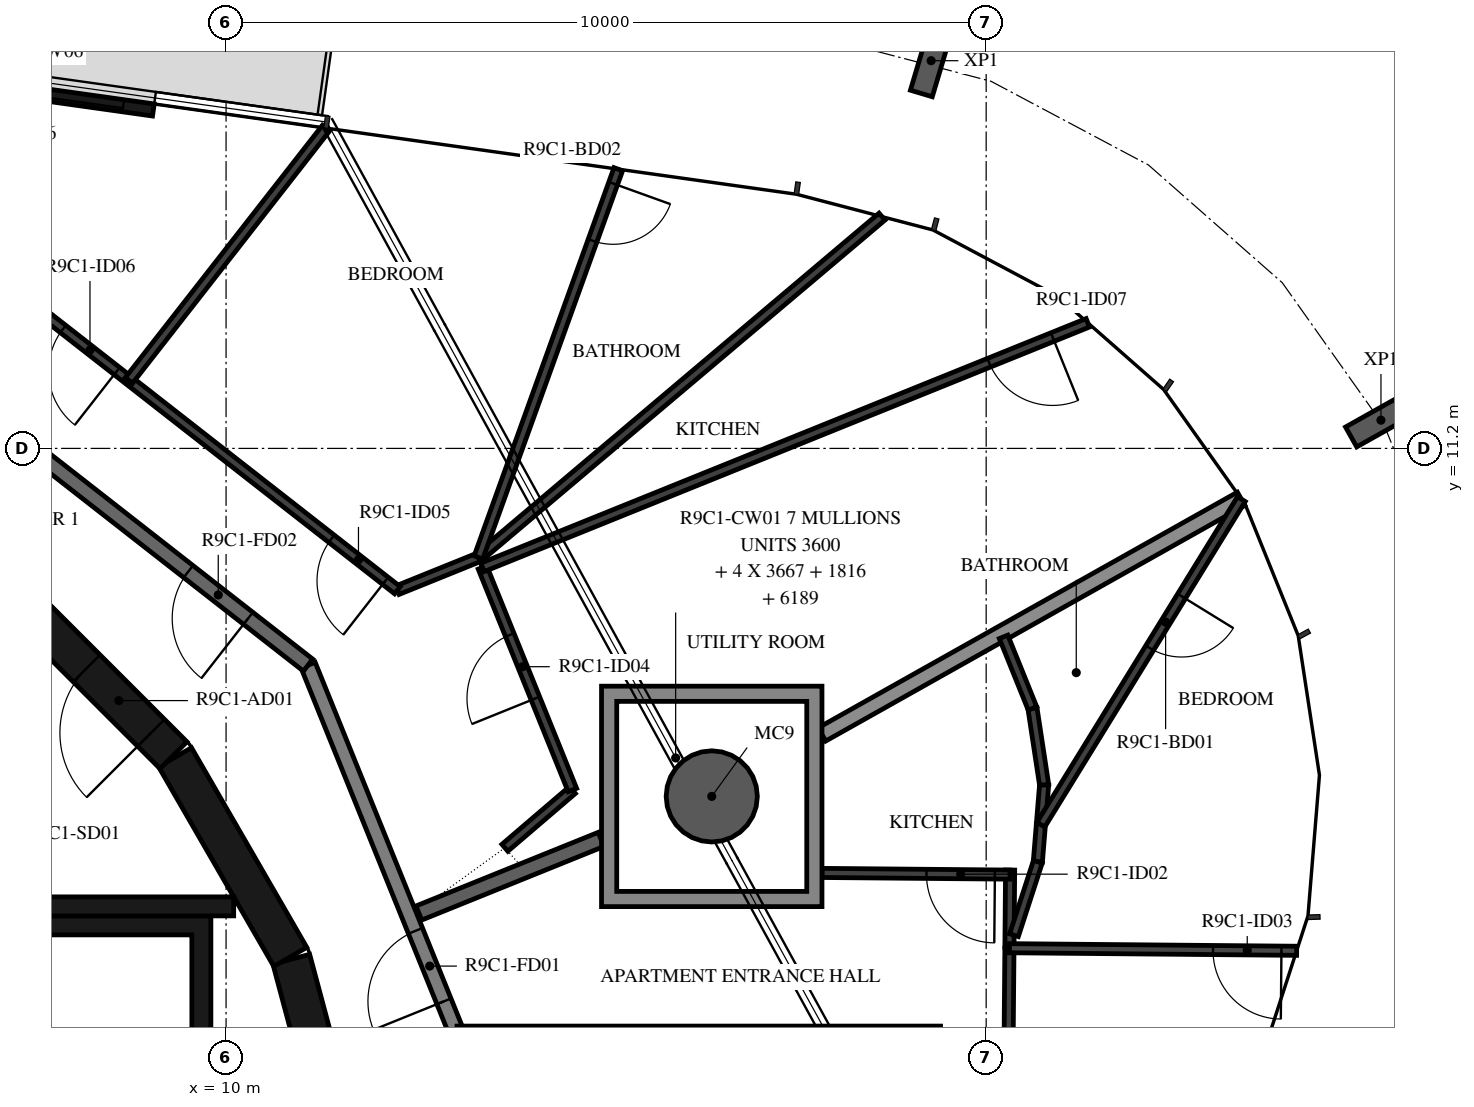
"""IFC4 building model, lengths in metres.
Left out: names, types, materials, properties, quantities, classifications, styles, units other than length and angle.
Written with IfcOpenShell. Run it as: python <this file> out.ifc"""

import sys

from ifc_helpers import new_model, si_unit, direction, frame, frame_2d, origin, origin_2d, place, context, subcontext, project, spatial, polyline, rectangle, hollow_circle, i_section, outline, extrude, element, fill, save


model = new_model("IFC4")
c1 = context("Model", 3, precision=1e-05, world=origin(), true_north=direction((0.0, 1.0)))
c2 = subcontext(c1, "Body", "Model", "MODEL_VIEW")
j1 = project(units=[si_unit("LENGTHUNIT", "METRE"), si_unit("PLANEANGLEUNIT", "RADIAN")], contexts=[c1])
p1 = place(None, origin())
s1 = spatial("IfcSite", under=j1, at=p1, CompositionType="ELEMENT")
p2 = place(p1, origin())
s2 = spatial("IfcBuilding", under=s1, at=p2, CompositionType="ELEMENT")
p3 = place(p2, frame((0.0, 0.0, 357.5)))
s3 = spatial("IfcBuildingStorey", under=s2, at=p3, CompositionType="ELEMENT", Elevation=357.5)
p4 = place(p3, frame((16.39, 6.622, -0.38), z_axis=(0.0, 0.0, 1.0), x_axis=(1.0, 0.0, 0.0)))
e1 = element("IfcColumn", 1, at=p4, inside=s3, PredefinedType="COLUMN", context=c2, shape_type="SweptSolid", body=[
    extrude(hollow_circle(Radius=0.6, WallThickness=0.03, at=origin_2d()), origin(), (0.0, 0.0, 1.0), 3.5),
])
for number, where, z_axis, x_axis in (
    (2, (25.194, 11.571, -0.38), (0.0, 0.0, 1.0), (0.49, -0.872, 0.0)),
    (3, (19.276, 16.301, -0.38), (0.0, 0.0, 1.0), (0.958, -0.286, 0.0)),
):
    element("IfcColumn", number, at=place(p3, frame(where, z_axis=z_axis, x_axis=x_axis)), inside=s3, PredefinedType="COLUMN", context=c2, shape_type="SweptSolid", body=[
        extrude(i_section(OverallWidth=0.3, OverallDepth=0.9, WebThickness=0.019, FlangeThickness=0.035, FilletRadius=0.03, at=origin_2d()), origin(), (0.0, 0.0, 1.0), 3.5),
    ])
p5 = place(p3, frame((9.043, 15.652, 0.0), z_axis=(0.0, 0.0, 1.0), x_axis=(-0.990270382149, 0.139156639217, 0.0)))
e4 = element("IfcWall", 4, at=p5, inside=s3, PredefinedType="STANDARD", context=c2, shape_type="SweptSolid", body=[
    extrude(rectangle(XDim=3.2, YDim=0.16, at=frame_2d((1.6, 0.0))), origin(), (0.0, 0.0, 1.0), 3.12),
])
p6 = place(p5, frame((0.4, 0.0, 0.0)))
e5 = element("IfcOpeningElement", 5, at=p6, cuts=e4, PredefinedType="OPENING", context=c2, shape_type="SweptSolid", body=[
    extrude(rectangle(XDim=2.4, YDim=2.4, at=frame_2d((1.2, 1.2))), frame((0.0, 0.09, 0.0), z_axis=(0.0, -1.0, 0.0), x_axis=(1.0, 0.0, 0.0)), (0.0, 0.0, 1.0), 0.18),
])
for number, where, z_axis, x_axis in (
    (6, (11.643, 1.55, 0.0), (0.0, 0.0, 1.0), (-0.259, 0.966, 0.0)),
    (7, (10.845, 4.51, 0.0), (0.0, 0.0, 1.0), (-0.5, 0.866, 0.0)),
):
    element("IfcWall", number, at=place(p3, frame(where, z_axis=z_axis, x_axis=x_axis)), inside=s3, PredefinedType="SHEAR", context=c2, shape_type="SweptSolid", body=[
        extrude(rectangle(XDim=3.033, YDim=0.5, at=frame_2d((1.516, 0.0))), origin(), (0.0, 0.0, 1.0), 3.12),
    ])
p7 = place(p3, frame((9.308, 7.164, 0.0), z_axis=(0.0, 0.0, 1.0), x_axis=(-0.707106781187, 0.707106781187, 0.0)))
e8 = element("IfcWall", 8, at=p7, inside=s3, PredefinedType="SHEAR", context=c2, shape_type="SweptSolid", body=[
    extrude(rectangle(XDim=3.032, YDim=0.5, at=frame_2d((1.516, 0.0))), origin(), (0.0, 0.0, 1.0), 3.12),
])
p8 = place(p7, frame((0.416, 0.0, 0.0)))
e9 = element("IfcOpeningElement", 9, at=p8, cuts=e8, PredefinedType="OPENING", context=c2, shape_type="SweptSolid", body=[
    extrude(rectangle(XDim=1.2, YDim=2.1, at=frame_2d((0.6, 1.05))), frame((0.0, 0.26, 0.0), z_axis=(0.0, -1.0, 0.0), x_axis=(1.0, 0.0, 0.0)), (0.0, 0.0, 1.0), 0.52),
])
p9 = place(p3, frame((7.0, 5.175, 0.0), z_axis=(0.0, 0.0, 1.0), x_axis=(1.0, 0.0, 0.0)))
e10 = element("IfcWall", 10, at=p9, inside=s3, PredefinedType="SHEAR", context=c2, shape_type="SweptSolid", body=[
    extrude(rectangle(XDim=3.1, YDim=0.25, at=frame_2d((1.55, 0.0))), origin(), (0.0, 0.0, 1.0), 3.12),
])
p10 = place(p3, origin())
e11 = element("IfcWall", 11, at=p10, inside=s3, PredefinedType="SHEAR", context=c2, shape_type="SweptSolid", body=[
    extrude(outline(polyline([(-9.8, 1.9), (-9.55, 1.9), (-9.55, 4.8), (3.1, 4.8), (3.1, 1.9), (3.35, 1.9), (3.35, 4.8), (5.25, 4.8), (5.25, 1.9), (5.5, 1.9), (5.5, 4.8), (7.4, 4.8), (7.4, 1.9), (7.65, 1.9), (7.65, 4.8), (9.55, 4.8), (9.55, 1.9), (9.8, 1.9), (9.8, 4.8), (9.8, 5.05), (-9.8, 5.05), (-9.8, 4.8), (-9.8, 1.9)])), origin(), (0.0, 0.0, 1.0), 3.12),
])
p11 = place(p3, frame((13.769, 1.691, 0.0), z_axis=(0.0, 0.0, 1.0), x_axis=(-0.374618189599, 0.92717916932, 0.0)))
e12 = element("IfcWall", 12, at=p11, inside=s3, PredefinedType="STANDARD", context=c2, shape_type="SweptSolid", body=[
    extrude(rectangle(XDim=7.181, YDim=0.2, at=frame_2d((3.591, 0.0))), origin(), (0.0, 0.0, 1.0), 3.12),
])
p12 = place(p11, frame((2.41, 0.0, 0.0)))
e13 = element("IfcOpeningElement", 13, at=p12, cuts=e12, PredefinedType="OPENING", context=c2, shape_type="SweptSolid", body=[
    extrude(rectangle(XDim=1.0, YDim=2.1, at=frame_2d((0.5, 1.05))), frame((0.0, 0.11, 0.0), z_axis=(0.0, -1.0, 0.0), x_axis=(1.0, 0.0, 0.0)), (0.0, 0.0, 1.0), 0.22),
])
p13 = place(p3, frame((11.079, 8.349, 0.0), z_axis=(0.0, 0.0, 1.0), x_axis=(-0.78800478687, 0.615669112324, 0.0)))
e14 = element("IfcWall", 14, at=p13, inside=s3, PredefinedType="STANDARD", context=c2, shape_type="SweptSolid", body=[
    extrude(rectangle(XDim=7.181, YDim=0.2, at=frame_2d((3.591, 0.0))), origin(), (0.0, 0.0, 1.0), 3.12),
])
p14 = place(p13, frame((1.0, 0.0, 0.0)))
e15 = element("IfcOpeningElement", 15, at=p14, cuts=e14, PredefinedType="OPENING", context=c2, shape_type="SweptSolid", body=[
    extrude(rectangle(XDim=1.0, YDim=2.1, at=frame_2d((0.5, 1.05))), frame((0.0, 0.11, 0.0), z_axis=(0.0, -1.0, 0.0), x_axis=(1.0, 0.0, 0.0)), (0.0, 0.0, 1.0), 0.22),
])
p15 = place(p3, frame((19.4, 3.5, 0.0), z_axis=(0.0, 0.0, 1.0), x_axis=(-1.0, 0.0, 0.0)))
e16 = element("IfcWall", 16, at=p15, inside=s3, PredefinedType="STANDARD", context=c2, shape_type="SweptSolid", body=[
    extrude(rectangle(XDim=6.362, YDim=0.2, at=frame_2d((3.181, 0.0))), origin(), (0.0, 0.0, 1.0), 3.12),
])
p16 = place(p3, frame((14.934, 6.056, 0.0), z_axis=(0.0, 0.0, 1.0), x_axis=(-0.927181938396, -0.374611336071, 0.0)))
e17 = element("IfcWall", 17, at=p16, inside=s3, PredefinedType="STANDARD", context=c2, shape_type="SweptSolid", body=[
    extrude(rectangle(XDim=2.586, YDim=0.2, at=frame_2d((1.293, 0.0))), origin(), (0.0, 0.0, 1.0), 3.12),
])
p17 = place(p3, frame((23.354, 10.537, 0.0), z_axis=(0.0, 0.0, 1.0), x_axis=(-0.871719790551, -0.490004700754, 0.0)))
e18 = element("IfcWall", 18, at=p17, inside=s3, PredefinedType="STANDARD", context=c2, shape_type="SweptSolid", body=[
    extrude(rectangle(XDim=6.326, YDim=0.2, at=frame_2d((3.163, 0.0))), origin(), (0.0, 0.0, 1.0), 2.73),
])
p18 = place(p3, frame((20.285, 2.293, 0.0), z_axis=(0.0, 0.0, 1.0), x_axis=(0.008900171034, 0.999960392693, 0.0)))
e19 = element("IfcWall", 19, at=p18, inside=s3, PredefinedType="PARTITIONING", context=c2, shape_type="SweptSolid", body=[
    extrude(rectangle(XDim=2.332, YDim=0.12, at=frame_2d((1.166, 0.0))), origin(), (0.0, 0.0, 1.0), 3.12),
])
p19 = place(p18, frame((0.2, 0.0, 0.0)))
e20 = element("IfcOpeningElement", 20, at=p19, cuts=e19, PredefinedType="OPENING", context=c2, shape_type="SweptSolid", body=[
    extrude(rectangle(XDim=0.9, YDim=2.1, at=frame_2d((0.45, 1.05))), frame((0.0, 0.07, 0.0), z_axis=(0.0, -1.0, 0.0), x_axis=(1.0, 0.0, 0.0)), (0.0, 0.0, 1.0), 0.14),
])
p20 = place(p3, frame((20.306, 4.639, 0.0), z_axis=(0.0, 0.0, 1.0), x_axis=(0.008906724211, 0.999960334345, 0.0)))
e21 = element("IfcWall", 21, at=p20, inside=s3, PredefinedType="PARTITIONING", context=c2, shape_type="SweptSolid", body=[
    extrude(rectangle(XDim=1.014, YDim=0.12, at=frame_2d((0.507, 0.0))), origin(), (0.0, 0.0, 1.0), 3.12),
])
p21 = place(p3, frame((20.315, 5.593, 0.0), z_axis=(0.0, 0.0, 1.0), x_axis=(-0.999960597409, 0.008877140833, 0.0)))
e22 = element("IfcWall", 22, at=p21, inside=s3, PredefinedType="PARTITIONING", context=c2, shape_type="SweptSolid", body=[
    extrude(rectangle(XDim=2.475, YDim=0.12, at=frame_2d((1.238, 0.0))), origin(), (0.0, 0.0, 1.0), 3.12),
])
p22 = place(p21, frame((0.2, 0.0, 0.0)))
e23 = element("IfcOpeningElement", 23, at=p22, cuts=e22, PredefinedType="OPENING", context=c2, shape_type="SweptSolid", body=[
    extrude(rectangle(XDim=0.9, YDim=2.1, at=frame_2d((0.45, 1.05))), frame((0.0, 0.07, 0.0), z_axis=(0.0, -1.0, 0.0), x_axis=(1.0, 0.0, 0.0)), (0.0, 0.0, 1.0), 0.14),
])
p23 = place(p3, frame((24.085, 4.591, 0.0), z_axis=(0.0, 0.0, 1.0), x_axis=(-0.99996025077, 0.008916102255, 0.0)))
e24 = element("IfcWall", 24, at=p23, inside=s3, PredefinedType="PARTITIONING", context=c2, shape_type="SweptSolid", body=[
    extrude(rectangle(XDim=3.779, YDim=0.12, at=frame_2d((1.889, 0.0))), origin(), (0.0, 0.0, 1.0), 2.73),
])
p24 = place(p23, frame((0.2, 0.0, 0.0)))
e25 = element("IfcOpeningElement", 25, at=p24, cuts=e24, PredefinedType="OPENING", context=c2, shape_type="SweptSolid", body=[
    extrude(rectangle(XDim=0.9, YDim=2.1, at=frame_2d((0.45, 1.05))), frame((0.0, 0.07, 0.0), z_axis=(0.0, -1.0, 0.0), x_axis=(1.0, 0.0, 0.0)), (0.0, 0.0, 1.0), 0.14),
])
p25 = place(p3, frame((20.762, 6.775, 0.0), z_axis=(0.0, 0.0, 1.0), x_axis=(-0.08121587, -0.996696534789, 0.0)))
e26 = element("IfcWall", 26, at=p25, inside=s3, PredefinedType="PARTITIONING", context=c2, shape_type="SweptSolid", body=[
    extrude(rectangle(XDim=1.016, YDim=0.12, at=frame_2d((0.508, 0.0))), origin(), (0.0, 0.0, 1.0), 3.12),
])
p26 = place(p3, frame((20.68, 5.762, 0.0), z_axis=(0.0, 0.0, 1.0), x_axis=(-0.30908063779, -0.951035834942, 0.0)))
e27 = element("IfcWall", 27, at=p26, inside=s3, PredefinedType="PARTITIONING", context=c2, shape_type="SweptSolid", body=[
    extrude(rectangle(XDim=1.016, YDim=0.12, at=frame_2d((0.508, 0.0))), origin(), (0.0, 0.0, 1.0), 3.12),
])
p27 = place(p3, frame((23.357, 10.532, 0.0), z_axis=(0.0, 0.0, 1.0), x_axis=(-0.524476563806, -0.851424884542, 0.0)))
e28 = element("IfcWall", 28, at=p27, inside=s3, PredefinedType="PARTITIONING", context=c2, shape_type="SweptSolid", body=[
    extrude(rectangle(XDim=5.029, YDim=0.12, at=frame_2d((2.515, 0.0))), origin(), (0.0, 0.0, 1.0), 3.12),
])
p28 = place(p27, frame((1.5, 0.0, 0.0)))
e29 = element("IfcOpeningElement", 29, at=p28, cuts=e28, PredefinedType="OPENING", context=c2, shape_type="SweptSolid", body=[
    extrude(rectangle(XDim=0.8, YDim=2.1, at=frame_2d((0.4, 1.05))), frame((0.0, 0.07, 0.0), z_axis=(0.0, -1.0, 0.0), x_axis=(1.0, 0.0, 0.0)), (0.0, 0.0, 1.0), 0.14),
])
p29 = place(p3, frame((20.762, 6.775, 0.0), z_axis=(0.0, 0.0, 1.0), x_axis=(-0.150702440861, 0.988579169474, 0.0)))
e30 = element("IfcWall", 30, at=p29, inside=s3, PredefinedType="PARTITIONING", context=c2, shape_type="SweptSolid", body=[
    extrude(rectangle(XDim=1.016, YDim=0.12, at=frame_2d((0.508, 0.0))), origin(), (0.0, 0.0, 1.0), 3.12),
])
p30 = place(p3, frame((20.609, 7.779, 0.0), z_axis=(0.0, 0.0, 1.0), x_axis=(-0.374371668856, 0.927278735633, 0.0)))
e31 = element("IfcWall", 31, at=p30, inside=s3, PredefinedType="PARTITIONING", context=c2, shape_type="SweptSolid", body=[
    extrude(rectangle(XDim=1.016, YDim=0.12, at=frame_2d((0.508, 0.0))), origin(), (0.0, 0.0, 1.0), 3.12),
])
p31 = place(p3, frame((13.668, 5.946, 0.0), z_axis=(0.0, 0.0, 1.0), x_axis=(0.759993221436, 0.649930998931, 0.0)))
e32 = element("IfcWall", 32, at=p31, inside=s3, PredefinedType="PARTITIONING", context=c2, shape_type="SweptSolid", body=[
    extrude(rectangle(XDim=1.169, YDim=0.12, at=frame_2d((0.584, 0.0))), origin(), (0.0, 0.0, 1.0), 3.12),
])
p32 = place(p3, frame((14.556, 6.706, 0.0), z_axis=(0.0, 0.0, 1.0), x_axis=(-0.374599774633, 0.927186609505, 0.0)))
e33 = element("IfcWall", 33, at=p32, inside=s3, PredefinedType="PARTITIONING", context=c2, shape_type="SweptSolid", body=[
    extrude(rectangle(XDim=3.159, YDim=0.12, at=frame_2d((1.58, 0.0))), origin(), (0.0, 0.0, 1.0), 3.12),
])
p33 = place(p32, frame((1.3, 0.0, 0.0)))
e34 = element("IfcOpeningElement", 34, at=p33, cuts=e33, PredefinedType="OPENING", context=c2, shape_type="SweptSolid", body=[
    extrude(rectangle(XDim=0.9, YDim=2.1, at=frame_2d((0.45, 1.05))), frame((0.0, 0.07, 0.0), z_axis=(0.0, -1.0, 0.0), x_axis=(1.0, 0.0, 0.0)), (0.0, 0.0, 1.0), 0.14),
])
p34 = place(p3, frame((13.32, 9.765, 0.0), z_axis=(0.0, 0.0, 1.0), x_axis=(-0.92716811739, -0.37464554194, 0.0)))
e35 = element("IfcWall", 35, at=p34, inside=s3, PredefinedType="PARTITIONING", context=c2, shape_type="SweptSolid", body=[
    extrude(rectangle(XDim=1.15, YDim=0.12, at=frame_2d((0.575, 0.0))), origin(), (0.0, 0.0, 1.0), 3.12),
])
p35 = place(p3, frame((12.254, 9.334, 0.0), z_axis=(0.0, 0.0, 1.0), x_axis=(-0.787994393996, 0.615682414098, 0.0)))
e36 = element("IfcWall", 36, at=p35, inside=s3, PredefinedType="PARTITIONING", context=c2, shape_type="SweptSolid", body=[
    extrude(rectangle(XDim=7.902, YDim=0.12, at=frame_2d((3.951, 0.0))), origin(), (0.0, 0.0, 1.0), 3.12),
])
p36 = place(p35, frame((0.2, 0.0, 0.0)))
e37 = element("IfcOpeningElement", 37, at=p36, cuts=e36, PredefinedType="OPENING", context=c2, shape_type="SweptSolid", body=[
    extrude(rectangle(XDim=0.9, YDim=2.1, at=frame_2d((0.45, 1.05))), frame((0.0, 0.07, 0.0), z_axis=(0.0, -1.0, 0.0), x_axis=(1.0, 0.0, 0.0)), (0.0, 0.0, 1.0), 0.14),
])
p37 = place(p35, frame((4.683, 0.0, 0.0)))
e38 = element("IfcOpeningElement", 38, at=p37, cuts=e36, PredefinedType="OPENING", context=c2, shape_type="SweptSolid", body=[
    extrude(rectangle(XDim=0.9, YDim=2.1, at=frame_2d((0.45, 1.05))), frame((0.0, 0.07, 0.0), z_axis=(0.0, -1.0, 0.0), x_axis=(1.0, 0.0, 0.0)), (0.0, 0.0, 1.0), 0.14),
])
p38 = place(p3, frame((21.337, 12.852, 0.0), z_axis=(0.0, 0.0, 1.0), x_axis=(-0.927185271553, -0.374603086232, 0.0)))
e39 = element("IfcWall", 39, at=p38, inside=s3, PredefinedType="PARTITIONING", context=c2, shape_type="SweptSolid", body=[
    extrude(rectangle(XDim=8.59, YDim=0.12, at=frame_2d((4.295, 0.0))), origin(), (0.0, 0.0, 1.0), 3.12),
])
p39 = place(p38, frame((0.5, 0.0, 0.0)))
e40 = element("IfcOpeningElement", 40, at=p39, cuts=e39, PredefinedType="OPENING", context=c2, shape_type="SweptSolid", body=[
    extrude(rectangle(XDim=0.9, YDim=2.1, at=frame_2d((0.45, 1.05))), frame((0.0, 0.07, 0.0), z_axis=(0.0, -1.0, 0.0), x_axis=(1.0, 0.0, 0.0)), (0.0, 0.0, 1.0), 0.14),
])
p40 = place(p3, frame((18.63, 14.249, 0.0), z_axis=(0.0, 0.0, 1.0), x_axis=(-0.763997588944, -0.64521909774, 0.0)))
e41 = element("IfcWall", 41, at=p40, inside=s3, PredefinedType="PARTITIONING", context=c2, shape_type="SweptSolid", body=[
    extrude(rectangle(XDim=6.949, YDim=0.12, at=frame_2d((3.475, 0.0))), origin(), (0.0, 0.0, 1.0), 3.12),
])
p41 = place(p3, frame((15.16, 14.873, 0.0), z_axis=(0.0, 0.0, 1.0), x_axis=(-0.338881884511, -0.940828926187, 0.0)))
e42 = element("IfcWall", 42, at=p41, inside=s3, PredefinedType="PARTITIONING", context=c2, shape_type="SweptSolid", body=[
    extrude(rectangle(XDim=5.429, YDim=0.12, at=frame_2d((2.715, 0.0))), origin(), (0.0, 0.0, 1.0), 3.12),
])
p42 = place(p41, frame((0.2, 0.0, 0.0)))
e43 = element("IfcOpeningElement", 43, at=p42, cuts=e42, PredefinedType="OPENING", context=c2, shape_type="SweptSolid", body=[
    extrude(rectangle(XDim=0.8, YDim=2.1, at=frame_2d((0.4, 1.05))), frame((0.0, 0.07, 0.0), z_axis=(0.0, -1.0, 0.0), x_axis=(1.0, 0.0, 0.0)), (0.0, 0.0, 1.0), 0.14),
])
p43 = place(p3, frame((11.315, 15.414, 0.0), z_axis=(0.0, 0.0, 1.0), x_axis=(-0.615656413137, -0.788014708596, 0.0)))
e44 = element("IfcWall", 44, at=p43, inside=s3, PredefinedType="PARTITIONING", context=c2, shape_type="SweptSolid", body=[
    extrude(rectangle(XDim=4.213, YDim=0.12, at=frame_2d((2.106, 0.0))), origin(), (0.0, 0.0, 1.0), 3.12),
])
p44 = place(p3, origin())
e45 = element("IfcWall", 45, at=p44, inside=s3, PredefinedType="STANDARD", context=c2, shape_type="SweptSolid", body=[
    extrude(outline(polyline([(17.84, 8.072), (17.84, 5.172), (14.94, 5.172), (14.94, 8.072), (17.84, 8.072)]), holes=[polyline([(15.14, 5.372), (17.64, 5.372), (17.64, 7.872), (15.14, 7.872), (15.14, 5.372)])]), origin(), (0.0, 0.0, 1.0), 3.12),
])
p45 = place(p6, origin())
e46 = element("IfcDoor", 46, at=p45, inside=s3, OperationType="DOUBLE_DOOR_SLIDING", PredefinedType="DOOR", context=c2, shape_type="SweptSolid", body=[
    extrude(rectangle(XDim=2.4, YDim=2.4, at=frame_2d((1.2, 1.2))), frame((0.0, 0.025, 0.0), z_axis=(0.0, -1.0, 0.0), x_axis=(1.0, 0.0, 0.0)), (0.0, 0.0, 1.0), 0.05),
])
fill(e5, e46)
p46 = place(p8, origin())
e47 = element("IfcDoor", 47, at=p46, inside=s3, OperationType="SINGLE_SWING_RIGHT", PredefinedType="DOOR", context=c2, shape_type="SweptSolid", body=[
    extrude(rectangle(XDim=1.2, YDim=2.1, at=frame_2d((0.6, 1.05))), frame((0.0, 0.025, 0.0), z_axis=(0.0, -1.0, 0.0), x_axis=(1.0, 0.0, 0.0)), (0.0, 0.0, 1.0), 0.05),
])
fill(e9, e47)
p47 = place(p12, origin())
e48 = element("IfcDoor", 48, at=p47, inside=s3, OperationType="SINGLE_SWING_LEFT", PredefinedType="DOOR", context=c2, shape_type="SweptSolid", body=[
    extrude(rectangle(XDim=1.0, YDim=2.1, at=frame_2d((0.5, 1.05))), frame((0.0, 0.025, 0.0), z_axis=(0.0, -1.0, 0.0), x_axis=(1.0, 0.0, 0.0)), (0.0, 0.0, 1.0), 0.05),
])
fill(e13, e48)
p48 = place(p22, origin())
e49 = element("IfcDoor", 49, at=p48, inside=s3, OperationType="SINGLE_SWING_RIGHT", PredefinedType="DOOR", context=c2, shape_type="SweptSolid", body=[
    extrude(rectangle(XDim=0.9, YDim=2.1, at=frame_2d((0.45, 1.05))), frame((0.0, 0.025, 0.0), z_axis=(0.0, -1.0, 0.0), x_axis=(1.0, 0.0, 0.0)), (0.0, 0.0, 1.0), 0.05),
])
fill(e23, e49)
p49 = place(p24, origin())
e50 = element("IfcDoor", 50, at=p49, inside=s3, OperationType="SINGLE_SWING_RIGHT", PredefinedType="DOOR", context=c2, shape_type="SweptSolid", body=[
    extrude(rectangle(XDim=0.9, YDim=2.1, at=frame_2d((0.45, 1.05))), frame((0.0, 0.025, 0.0), z_axis=(0.0, -1.0, 0.0), x_axis=(1.0, 0.0, 0.0)), (0.0, 0.0, 1.0), 0.05),
])
fill(e25, e50)
p50 = place(p28, origin())
e51 = element("IfcDoor", 51, at=p50, inside=s3, OperationType="SINGLE_SWING_RIGHT", PredefinedType="DOOR", context=c2, shape_type="SweptSolid", body=[
    extrude(rectangle(XDim=0.8, YDim=2.1, at=frame_2d((0.4, 1.05))), frame((0.0, 0.025, 0.0), z_axis=(0.0, -1.0, 0.0), x_axis=(1.0, 0.0, 0.0)), (0.0, 0.0, 1.0), 0.05),
])
fill(e29, e51)
p51 = place(p14, origin())
e52 = element("IfcDoor", 52, at=p51, inside=s3, OperationType="SINGLE_SWING_LEFT", PredefinedType="DOOR", context=c2, shape_type="SweptSolid", body=[
    extrude(rectangle(XDim=1.0, YDim=2.1, at=frame_2d((0.5, 1.05))), frame((0.0, 0.025, 0.0), z_axis=(0.0, -1.0, 0.0), x_axis=(1.0, 0.0, 0.0)), (0.0, 0.0, 1.0), 0.05),
])
fill(e15, e52)
p52 = place(p33, origin())
e53 = element("IfcDoor", 53, at=p52, inside=s3, OperationType="SINGLE_SWING_LEFT", PredefinedType="DOOR", context=c2, shape_type="SweptSolid", body=[
    extrude(rectangle(XDim=0.9, YDim=2.1, at=frame_2d((0.45, 1.05))), frame((0.0, 0.025, 0.0), z_axis=(0.0, -1.0, 0.0), x_axis=(1.0, 0.0, 0.0)), (0.0, 0.0, 1.0), 0.05),
])
fill(e34, e53)
p53 = place(p36, origin())
e54 = element("IfcDoor", 54, at=p53, inside=s3, OperationType="SINGLE_SWING_LEFT", PredefinedType="DOOR", context=c2, shape_type="SweptSolid", body=[
    extrude(rectangle(XDim=0.9, YDim=2.1, at=frame_2d((0.45, 1.05))), frame((0.0, 0.025, 0.0), z_axis=(0.0, -1.0, 0.0), x_axis=(1.0, 0.0, 0.0)), (0.0, 0.0, 1.0), 0.05),
])
fill(e37, e54)
p54 = place(p37, origin())
e55 = element("IfcDoor", 55, at=p54, inside=s3, OperationType="SINGLE_SWING_LEFT", PredefinedType="DOOR", context=c2, shape_type="SweptSolid", body=[
    extrude(rectangle(XDim=0.9, YDim=2.1, at=frame_2d((0.45, 1.05))), frame((0.0, 0.025, 0.0), z_axis=(0.0, -1.0, 0.0), x_axis=(1.0, 0.0, 0.0)), (0.0, 0.0, 1.0), 0.05),
])
fill(e38, e55)
p55 = place(p39, origin())
e56 = element("IfcDoor", 56, at=p55, inside=s3, OperationType="SINGLE_SWING_RIGHT", PredefinedType="DOOR", context=c2, shape_type="SweptSolid", body=[
    extrude(rectangle(XDim=0.9, YDim=2.1, at=frame_2d((0.45, 1.05))), frame((0.0, 0.025, 0.0), z_axis=(0.0, -1.0, 0.0), x_axis=(1.0, 0.0, 0.0)), (0.0, 0.0, 1.0), 0.05),
])
fill(e40, e56)
p56 = place(p42, origin())
e57 = element("IfcDoor", 57, at=p56, inside=s3, OperationType="SINGLE_SWING_LEFT", PredefinedType="DOOR", context=c2, shape_type="SweptSolid", body=[
    extrude(rectangle(XDim=0.8, YDim=2.1, at=frame_2d((0.4, 1.05))), frame((0.0, 0.025, 0.0), z_axis=(0.0, -1.0, 0.0), x_axis=(1.0, 0.0, 0.0)), (0.0, 0.0, 1.0), 0.05),
])
fill(e43, e57)
save(model, sys.argv[1])
